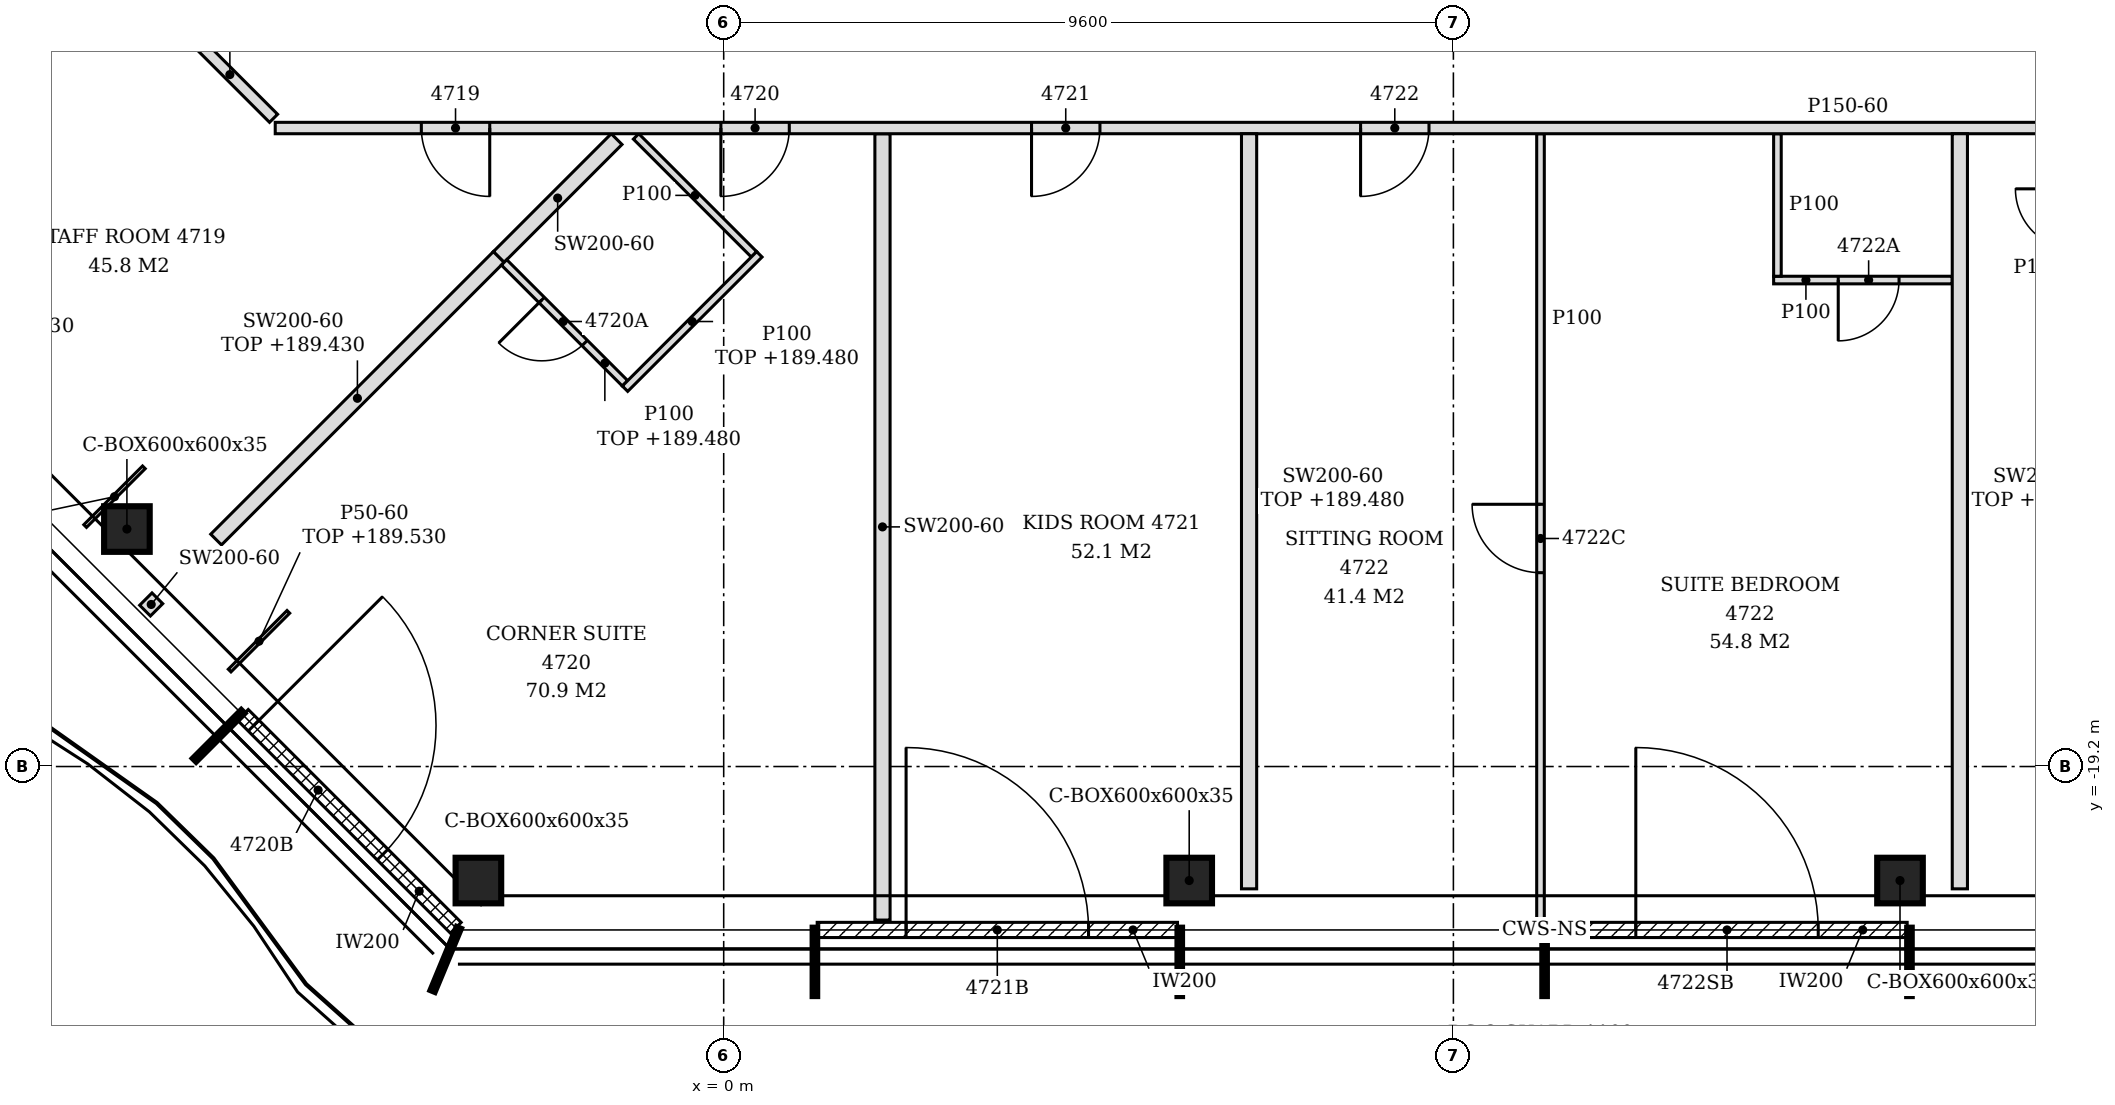
"""IFC4 building model, lengths in metres.
Left out: names, types, materials, properties, quantities, classifications, styles, units other than length and angle.
Written with IfcOpenShell. Run it as: python <this file> out.ifc"""

import sys

from ifc_helpers import new_model, si_unit, direction, frame, frame_2d, origin, origin_2d, place, context, subcontext, project, spatial, polyline, rectangle, hollow_rectangle, outline, extrude, clip, halfspace, element, fill, save


model = new_model("IFC4")
c1 = context("Model", 3, precision=1e-05, world=origin(), true_north=direction((0.0, 1.0)))
c2 = subcontext(c1, "Body", "Model", "MODEL_VIEW")
j1 = project(units=[si_unit("LENGTHUNIT", "METRE"), si_unit("PLANEANGLEUNIT", "RADIAN")], contexts=[c1])
p1 = place(None, origin())
s1 = spatial("IfcSite", under=j1, at=p1, CompositionType="ELEMENT")
p2 = place(p1, origin())
s2 = spatial("IfcBuilding", under=s1, at=p2, CompositionType="ELEMENT")
p3 = place(p2, frame((0.0, 0.0, 186.6)))
s3 = spatial("IfcBuildingStorey", under=s2, at=p3, CompositionType="ELEMENT", Elevation=186.6)
p4 = place(p3, frame((-3.227, -20.7, -0.15), z_axis=(0.38726387287, -0.258155907814, 0.885088820419), x_axis=(0.554670435147, 0.832070134288, 0.0)))
e1 = element("IfcColumn", 1, at=p4, inside=s3, PredefinedType="COLUMN", context=c2, shape_type="Clipping", body=[
    clip(extrude(hollow_rectangle(XDim=0.6, YDim=0.6, WallThickness=0.035, at=origin_2d()), origin(), (0.0, 0.0, 1.0), 4.067), halfspace(frame((0.0, 0.0, 4.049), z_axis=(0.0, 0.0, 1.0), x_axis=(1.0, 0.0, 0.0)), False)),
])
p5 = place(p3, frame((6.124, -20.7, -0.15), z_axis=(0.387212850535, -0.258161908255, 0.885109392961), x_axis=(0.554729959787, 0.832030451194, 0.0)))
e2 = element("IfcColumn", 2, at=p5, inside=s3, PredefinedType="COLUMN", context=c2, shape_type="Clipping", body=[
    clip(extrude(hollow_rectangle(XDim=0.6, YDim=0.6, WallThickness=0.035, at=origin_2d()), origin(), (0.0, 0.0, 1.0), 4.067), halfspace(frame((0.0, 0.0, 4.049), z_axis=(0.0, 0.0, 1.0), x_axis=(1.0, 0.0, 0.0)), False)),
])
p6 = place(p3, frame((15.476, -20.7, -0.15), z_axis=(0.38726387287, -0.258155907814, 0.885088820419), x_axis=(0.554670435147, 0.832070134288, 0.0)))
e3 = element("IfcColumn", 3, at=p6, inside=s3, PredefinedType="COLUMN", context=c2, shape_type="Clipping", body=[
    clip(extrude(hollow_rectangle(XDim=0.6, YDim=0.6, WallThickness=0.035, at=origin_2d()), origin(), (0.0, 0.0, 1.0), 4.067), halfspace(frame((0.0, 0.0, 4.049), z_axis=(0.0, 0.0, 1.0), x_axis=(1.0, 0.0, 0.0)), False)),
])
p7 = place(p3, frame((-7.852, -16.076, -0.15), z_axis=(0.387212850535, -0.258161908255, 0.885109392961), x_axis=(0.554729959787, 0.832030451194, 0.0)))
e4 = element("IfcColumn", 4, at=p7, inside=s3, PredefinedType="COLUMN", context=c2, shape_type="Clipping", body=[
    clip(extrude(hollow_rectangle(XDim=0.6, YDim=0.6, WallThickness=0.035, at=origin_2d()), origin(), (0.0, 0.0, 1.0), 4.067), halfspace(frame((0.0, 0.0, 4.049), z_axis=(0.0, 0.0, 1.0), x_axis=(1.0, 0.0, 0.0)), False)),
])
p8 = place(p3, frame((1.23, -21.35, 0.0), z_axis=(0.0, 0.0, 1.0), x_axis=(1.0, 0.0, 0.0)))
e5 = element("IfcWall", 5, at=p8, inside=s3, PredefinedType="NOTDEFINED", context=c2, shape_type="SweptSolid", body=[
    extrude(rectangle(XDim=4.74, YDim=0.2, at=frame_2d((2.37, 0.0))), origin(), (0.0, 0.0, 1.0), 3.45),
])
p9 = place(p8, frame((1.17, 0.0, 0.0)))
e6 = element("IfcOpeningElement", 6, at=p9, cuts=e5, PredefinedType="OPENING", context=c2, shape_type="SweptSolid", body=[
    extrude(rectangle(XDim=2.4, YDim=2.4, at=frame_2d((1.2, 1.2))), frame((0.0, 0.11, 0.0), z_axis=(0.0, -1.0, 0.0), x_axis=(1.0, 0.0, 0.0)), (0.0, 0.0, 1.0), 0.22),
])
p10 = place(p3, frame((10.83, -21.35, 0.0), z_axis=(0.0, 0.0, 1.0), x_axis=(1.0, 0.0, 0.0)))
e7 = element("IfcWall", 7, at=p10, inside=s3, PredefinedType="NOTDEFINED", context=c2, shape_type="SweptSolid", body=[
    extrude(rectangle(XDim=4.74, YDim=0.2, at=frame_2d((2.37, 0.0))), origin(), (0.0, 0.0, 1.0), 3.45),
])
p11 = place(p10, frame((1.17, 0.0, 0.0)))
e8 = element("IfcOpeningElement", 8, at=p11, cuts=e7, PredefinedType="OPENING", context=c2, shape_type="SweptSolid", body=[
    extrude(rectangle(XDim=2.4, YDim=2.4, at=frame_2d((1.2, 1.2))), frame((0.0, 0.11, 0.0), z_axis=(0.0, -1.0, 0.0), x_axis=(1.0, 0.0, 0.0)), (0.0, 0.0, 1.0), 0.22),
])
p12 = place(p3, frame((-6.326, -18.521, 0.0), z_axis=(0.0, 0.0, 1.0), x_axis=(0.707106781187, -0.707106781187, 0.0)))
e9 = element("IfcWall", 9, at=p12, inside=s3, PredefinedType="NOTDEFINED", context=c2, shape_type="SweptSolid", body=[
    extrude(rectangle(XDim=3.962, YDim=0.2, at=frame_2d((1.981, 0.0))), origin(), (0.0, 0.0, 1.0), 3.45),
])
p13 = place(p12, frame((0.2, 0.0, 0.0)))
e10 = element("IfcOpeningElement", 10, at=p13, cuts=e9, PredefinedType="OPENING", context=c2, shape_type="SweptSolid", body=[
    extrude(rectangle(XDim=2.4, YDim=2.4, at=frame_2d((1.2, 1.2))), frame((0.0, 0.11, 0.0), z_axis=(0.0, -1.0, 0.0), x_axis=(1.0, 0.0, 0.0)), (0.0, 0.0, 1.0), 0.22),
])
p14 = place(p3, frame((10.746, -21.303, 0.0), z_axis=(0.0, 0.0, 1.0), x_axis=(0.0, 1.0, 0.0)))
e11 = element("IfcWall", 11, at=p14, inside=s3, PredefinedType="PARTITIONING", context=c2, shape_type="SweptSolid", body=[
    extrude(outline(polyline([(0.0, 0.0), (10.428, 0.0), (10.428, 3.45), (8.358, 3.45), (8.356, 2.88), (8.148, 2.88), (8.146, 3.45), (3.558, 3.45), (3.556, 2.88), (3.348, 2.88), (3.346, 3.45), (0.0, 3.45), (0.0, 0.0)])), frame((0.0, 0.05, 0.0), z_axis=(0.0, -1.0, 0.0), x_axis=(1.0, 0.0, 0.0)), (0.0, 0.0, 1.0), 0.1),
])
p15 = place(p14, frame((4.653, 0.0, 0.0)))
e12 = element("IfcOpeningElement", 12, at=p15, cuts=e11, PredefinedType="OPENING", context=c2, shape_type="SweptSolid", body=[
    extrude(rectangle(XDim=0.9, YDim=2.1, at=frame_2d((0.45, 1.05))), frame((0.0, 0.06, 0.0), z_axis=(0.0, -1.0, 0.0), x_axis=(1.0, 0.0, 0.0)), (0.0, 0.0, 1.0), 0.12),
])
p16 = place(p3, frame((2.089, -21.22, 0.0), z_axis=(0.0, 0.0, 1.0), x_axis=(0.0, 1.0, 0.0)))
e13 = element("IfcWall", 13, at=p16, inside=s3, PredefinedType="PARTITIONING", context=c2, shape_type="SweptSolid", body=[
    extrude(outline(polyline([(0.0, 0.0), (10.345, 0.0), (10.345, 3.45), (8.275, 3.45), (8.273, 2.88), (8.065, 2.88), (8.063, 3.45), (3.475, 3.45), (3.473, 2.88), (3.265, 2.88), (3.263, 3.45), (0.0, 3.45), (0.0, 0.0)])), frame((0.0, 0.1, 0.0), z_axis=(0.0, -1.0, 0.0), x_axis=(1.0, 0.0, 0.0)), (0.0, 0.0, 1.0), 0.2),
])
p17 = place(p3, frame((6.912, -20.809, 0.0), z_axis=(0.0, 0.0, 1.0), x_axis=(0.0, 1.0, 0.0)))
e14 = element("IfcWall", 14, at=p17, inside=s3, PredefinedType="PARTITIONING", context=c2, shape_type="SweptSolid", body=[
    extrude(outline(polyline([(0.011, 0.0), (9.934, 0.0), (9.934, 0.862), (9.934, 1.725), (9.934, 2.587), (9.934, 2.88), (0.0, 2.88), (0.0, 2.587), (0.0, 1.725), (0.011, 0.862), (0.011, 0.0)])), frame((0.0, 0.1, 0.0), z_axis=(0.0, -1.0, 0.0), x_axis=(1.0, 0.0, 0.0)), (0.0, 0.0, 1.0), 0.2),
])
p18 = place(p3, frame((16.263, -20.809, 0.0), z_axis=(0.0, 0.0, 1.0), x_axis=(0.0, 1.0, 0.0)))
e15 = element("IfcWall", 15, at=p18, inside=s3, PredefinedType="PARTITIONING", context=c2, shape_type="SweptSolid", body=[
    extrude(outline(polyline([(0.012, 0.0), (9.934, 0.0), (9.934, 0.862), (9.934, 1.725), (9.934, 2.587), (9.934, 2.88), (0.0, 2.88), (0.0, 2.587), (0.0, 1.725), (0.012, 0.862), (0.012, 0.0)])), frame((0.0, 0.1, 0.0), z_axis=(0.0, -1.0, 0.0), x_axis=(1.0, 0.0, 0.0)), (0.0, 0.0, 1.0), 0.2),
])
p19 = place(p3, frame((-7.613, -17.149, 0.0), z_axis=(0.0, 0.0, 1.0), x_axis=(0.707639441435, 0.706573719385, 0.0)))
e16 = element("IfcWall", 16, at=p19, inside=s3, PredefinedType="PARTITIONING", context=c2, shape_type="SweptSolid", body=[
    extrude(rectangle(XDim=0.229, YDim=0.2, at=frame_2d((0.115, 0.0))), origin(), (0.0, 0.0, 1.0), 3.45),
])
p20 = place(p3, frame((-6.678, -16.214, 0.0), z_axis=(0.0, 0.0, 1.0), x_axis=(0.707199650476, 0.707013899698, 0.0)))
e17 = element("IfcWall", 17, at=p20, inside=s3, PredefinedType="PARTITIONING", context=c2, shape_type="SweptSolid", body=[
    extrude(rectangle(XDim=5.257, YDim=0.2, at=frame_2d((2.629, 0.0))), origin(), (0.0, 0.0, 1.0), 2.83),
])
p21 = place(p3, frame((-1.298, -14.159, 0.0), z_axis=(0.0, 0.0, 1.0), x_axis=(-0.707106781187, 0.707106781187, 0.0)))
e18 = element("IfcWall", 18, at=p21, inside=s3, PredefinedType="PARTITIONING", context=c2, shape_type="SweptSolid", body=[
    extrude(rectangle(XDim=2.25, YDim=0.1, at=frame_2d((1.125, 0.0))), origin(), (0.0, 0.0, 1.0), 2.88),
])
p22 = place(p21, frame((0.75, 0.0, 0.0)))
e19 = element("IfcOpeningElement", 19, at=p22, cuts=e18, PredefinedType="OPENING", context=c2, shape_type="SweptSolid", body=[
    extrude(rectangle(XDim=0.8, YDim=2.1, at=frame_2d((0.4, 1.05))), frame((0.0, 0.06, 0.0), z_axis=(0.0, -1.0, 0.0), x_axis=(1.0, 0.0, 0.0)), (0.0, 0.0, 1.0), 0.12),
])
p23 = place(p3, frame((-1.298, -14.229, 0.0), z_axis=(0.0, 0.0, 1.0), x_axis=(0.707057949532, 0.707155609469, 0.0)))
e20 = element("IfcWall", 20, at=p23, inside=s3, PredefinedType="PARTITIONING", context=c2, shape_type="SweptSolid", body=[
    extrude(rectangle(XDim=2.5, YDim=0.1, at=frame_2d((1.25, 0.0))), origin(), (0.0, 0.0, 1.0), 2.88),
])
p24 = place(p3, frame((13.813, -12.8, 0.0), z_axis=(0.0, 0.0, 1.0), x_axis=(1.0, 0.0, 0.0)))
e21 = element("IfcWall", 21, at=p24, inside=s3, PredefinedType="PARTITIONING", context=c2, shape_type="SweptSolid", body=[
    extrude(rectangle(XDim=2.35, YDim=0.1, at=frame_2d((1.175, 0.0))), origin(), (0.0, 0.0, 1.0), 3.45),
])
p25 = place(p24, frame((0.85, 0.0, 0.0)))
e22 = element("IfcOpeningElement", 22, at=p25, cuts=e21, PredefinedType="OPENING", context=c2, shape_type="SweptSolid", body=[
    extrude(rectangle(XDim=0.8, YDim=2.1, at=frame_2d((0.4, 1.05))), frame((0.0, 0.06, 0.0), z_axis=(0.0, -1.0, 0.0), x_axis=(1.0, 0.0, 0.0)), (0.0, 0.0, 1.0), 0.12),
])
p26 = place(p3, frame((13.863, -12.75, 0.0), z_axis=(0.0, 0.0, 1.0), x_axis=(0.0, 1.0, 0.0)))
e23 = element("IfcWall", 23, at=p26, inside=s3, PredefinedType="PARTITIONING", context=c2, shape_type="SweptSolid", body=[
    extrude(rectangle(XDim=1.875, YDim=0.1, at=frame_2d((0.938, 0.0))), origin(), (0.0, 0.0, 1.0), 3.45),
])
p27 = place(p3, frame((-2.96, -12.497, 0.0), z_axis=(0.0, 0.0, 1.0), x_axis=(0.707106781187, 0.707106781187, 0.0)))
e24 = element("IfcWall", 24, at=p27, inside=s3, PredefinedType="PARTITIONING", context=c2, shape_type="SweptSolid", body=[
    extrude(rectangle(XDim=2.194, YDim=0.2, at=frame_2d((1.097, 0.0))), origin(), (0.0, 0.0, 1.0), 3.45),
])
p28 = place(p3, frame((0.399, -12.462, 0.0), z_axis=(0.0, 0.0, 1.0), x_axis=(-0.707106781187, 0.707106781187, 0.0)))
e25 = element("IfcWall", 25, at=p28, inside=s3, PredefinedType="PARTITIONING", context=c2, shape_type="SweptSolid", body=[
    extrude(rectangle(XDim=2.194, YDim=0.1, at=frame_2d((1.097, 0.0))), origin(), (0.0, 0.0, 1.0), 3.45),
])
p29 = place(p3, frame((-11.302, -11.59, 0.0), z_axis=(0.0, 0.0, 1.0), x_axis=(0.707106781187, 0.707106781187, 0.0)))
e26 = element("IfcWall", 26, at=p29, inside=s3, PredefinedType="PARTITIONING", context=c2, shape_type="SweptSolid", body=[
    extrude(rectangle(XDim=5.595, YDim=0.2, at=frame_2d((2.797, 0.0))), origin(), (0.0, 0.0, 1.0), 2.93),
])
p30 = place(p3, frame((-5.9, -10.8, 0.0), z_axis=(0.0, 0.0, 1.0), x_axis=(1.0, 0.0, 0.0)))
e27 = element("IfcWall", 27, at=p30, inside=s3, PredefinedType="PARTITIONING", context=c2, shape_type="SweptSolid", body=[
    extrude(outline(polyline([(0.0, 0.0), (26.2, 0.0), (26.2, 3.45), (25.25, 3.45), (25.248, 2.73), (24.95, 2.73), (24.948, 3.45), (13.25, 3.45), (13.248, 2.73), (12.95, 2.73), (12.948, 3.45), (1.25, 3.45), (1.248, 2.83), (0.95, 2.83), (0.948, 3.45), (0.0, 3.45), (0.0, 0.0)])), frame((0.0, 0.075, 0.0), z_axis=(0.0, -1.0, 0.0), x_axis=(1.0, 0.0, 0.0)), (0.0, 0.0, 1.0), 0.15),
])
p31 = place(p30, frame((1.922, 0.0, 0.0)))
e28 = element("IfcOpeningElement", 28, at=p31, cuts=e27, PredefinedType="OPENING", context=c2, shape_type="SweptSolid", body=[
    extrude(rectangle(XDim=0.9, YDim=2.1, at=frame_2d((0.45, 1.05))), frame((0.0, 0.085, 0.0), z_axis=(0.0, -1.0, 0.0), x_axis=(1.0, 0.0, 0.0)), (0.0, 0.0, 1.0), 0.17),
])
p32 = place(p30, frame((5.863, 0.0, 0.0)))
e29 = element("IfcOpeningElement", 29, at=p32, cuts=e27, PredefinedType="OPENING", context=c2, shape_type="SweptSolid", body=[
    extrude(rectangle(XDim=0.9, YDim=2.1, at=frame_2d((0.45, 1.05))), frame((0.0, 0.085, 0.0), z_axis=(0.0, -1.0, 0.0), x_axis=(1.0, 0.0, 0.0)), (0.0, 0.0, 1.0), 0.17),
])
p33 = place(p30, frame((9.95, 0.0, 0.0)))
e30 = element("IfcOpeningElement", 30, at=p33, cuts=e27, PredefinedType="OPENING", context=c2, shape_type="SweptSolid", body=[
    extrude(rectangle(XDim=0.9, YDim=2.1, at=frame_2d((0.45, 1.05))), frame((0.0, 0.085, 0.0), z_axis=(0.0, -1.0, 0.0), x_axis=(1.0, 0.0, 0.0)), (0.0, 0.0, 1.0), 0.17),
])
p34 = place(p30, frame((14.279, 0.0, 0.0)))
e31 = element("IfcOpeningElement", 31, at=p34, cuts=e27, PredefinedType="OPENING", context=c2, shape_type="SweptSolid", body=[
    extrude(rectangle(XDim=0.9, YDim=2.1, at=frame_2d((0.45, 1.05))), frame((0.0, 0.085, 0.0), z_axis=(0.0, -1.0, 0.0), x_axis=(1.0, 0.0, 0.0)), (0.0, 0.0, 1.0), 0.17),
])
p35 = place(p3, frame((-5.922, -10.672, 0.0), z_axis=(0.0, 0.0, 1.0), x_axis=(-0.707031720757, 0.707181833649, 0.0)))
e32 = element("IfcWall", 32, at=p35, inside=s3, PredefinedType="PARTITIONING", context=c2, shape_type="SweptSolid", body=[
    extrude(rectangle(XDim=1.626, YDim=0.15, at=frame_2d((0.813, 0.0))), origin(), (0.0, 0.0, 1.0), 3.45),
])
p36 = place(p3, frame((-6.5, -17.938, 0.0), z_axis=(0.0, 0.0, 1.0), x_axis=(0.707106781187, 0.707106781187, 0.0)))
e33 = element("IfcWall", 33, at=p36, inside=s3, PredefinedType="PARTITIONING", context=c2, shape_type="SweptSolid", body=[
    extrude(rectangle(XDim=1.093, YDim=0.05, at=frame_2d((0.546, 0.0))), origin(), (0.0, 0.0, 1.0), 2.93),
])
p37 = place(p3, frame((-8.401, -16.036, 0.0), z_axis=(0.0, 0.0, 1.0), x_axis=(0.707106781187, 0.707106781187, 0.0)))
e34 = element("IfcWall", 34, at=p37, inside=s3, PredefinedType="PARTITIONING", context=c2, shape_type="SweptSolid", body=[
    extrude(rectangle(XDim=1.093, YDim=0.05, at=frame_2d((0.546, 0.0))), origin(), (0.0, 0.0, 1.0), 2.63),
])
p38 = place(p9, origin())
e35 = element("IfcDoor", 35, at=p38, inside=s3, OperationType="SINGLE_SWING_LEFT", PredefinedType="DOOR", context=c2, shape_type="SweptSolid", body=[
    extrude(rectangle(XDim=2.4, YDim=2.4, at=frame_2d((1.2, 1.2))), frame((0.0, 0.025, 0.0), z_axis=(0.0, -1.0, 0.0), x_axis=(1.0, 0.0, 0.0)), (0.0, 0.0, 1.0), 0.05),
])
fill(e6, e35)
p39 = place(p11, origin())
e36 = element("IfcDoor", 36, at=p39, inside=s3, OperationType="SINGLE_SWING_LEFT", PredefinedType="DOOR", context=c2, shape_type="SweptSolid", body=[
    extrude(rectangle(XDim=2.4, YDim=2.4, at=frame_2d((1.2, 1.2))), frame((0.0, 0.025, 0.0), z_axis=(0.0, -1.0, 0.0), x_axis=(1.0, 0.0, 0.0)), (0.0, 0.0, 1.0), 0.05),
])
fill(e8, e36)
p40 = place(p13, origin())
e37 = element("IfcDoor", 37, at=p40, inside=s3, OperationType="SINGLE_SWING_LEFT", PredefinedType="DOOR", context=c2, shape_type="SweptSolid", body=[
    extrude(rectangle(XDim=2.4, YDim=2.4, at=frame_2d((1.2, 1.2))), frame((0.0, 0.025, 0.0), z_axis=(0.0, -1.0, 0.0), x_axis=(1.0, 0.0, 0.0)), (0.0, 0.0, 1.0), 0.05),
])
fill(e10, e37)
p41 = place(p31, frame((0.9, 0.0, 0.0), z_axis=(0.0, 0.0, 1.0), x_axis=(-1.0, 0.0, 0.0)))
e38 = element("IfcDoor", 38, at=p41, inside=s3, OperationType="SINGLE_SWING_LEFT", PredefinedType="DOOR", context=c2, shape_type="SweptSolid", body=[
    extrude(rectangle(XDim=0.9, YDim=2.1, at=frame_2d((0.45, 1.05))), frame((0.0, 0.025, 0.0), z_axis=(0.0, -1.0, 0.0), x_axis=(1.0, 0.0, 0.0)), (0.0, 0.0, 1.0), 0.05),
])
fill(e28, e38)
p42 = place(p32, frame((0.9, 0.0, 0.0), z_axis=(0.0, 0.0, 1.0), x_axis=(-1.0, 0.0, 0.0)))
e39 = element("IfcDoor", 39, at=p42, inside=s3, OperationType="SINGLE_SWING_RIGHT", PredefinedType="DOOR", context=c2, shape_type="SweptSolid", body=[
    extrude(rectangle(XDim=0.9, YDim=2.1, at=frame_2d((0.45, 1.05))), frame((0.0, 0.025, 0.0), z_axis=(0.0, -1.0, 0.0), x_axis=(1.0, 0.0, 0.0)), (0.0, 0.0, 1.0), 0.05),
])
fill(e29, e39)
p43 = place(p22, origin())
e40 = element("IfcDoor", 40, at=p43, inside=s3, OperationType="SINGLE_SWING_RIGHT", PredefinedType="DOOR", context=c2, shape_type="SweptSolid", body=[
    extrude(rectangle(XDim=0.8, YDim=2.1, at=frame_2d((0.4, 1.05))), frame((0.0, 0.025, 0.0), z_axis=(0.0, -1.0, 0.0), x_axis=(1.0, 0.0, 0.0)), (0.0, 0.0, 1.0), 0.05),
])
fill(e19, e40)
p44 = place(p33, frame((0.9, 0.0, 0.0), z_axis=(0.0, 0.0, 1.0), x_axis=(-1.0, 0.0, 0.0)))
e41 = element("IfcDoor", 41, at=p44, inside=s3, OperationType="SINGLE_SWING_RIGHT", PredefinedType="DOOR", context=c2, shape_type="SweptSolid", body=[
    extrude(rectangle(XDim=0.9, YDim=2.1, at=frame_2d((0.45, 1.05))), frame((0.0, 0.025, 0.0), z_axis=(0.0, -1.0, 0.0), x_axis=(1.0, 0.0, 0.0)), (0.0, 0.0, 1.0), 0.05),
])
fill(e30, e41)
p45 = place(p34, frame((0.9, 0.0, 0.0), z_axis=(0.0, 0.0, 1.0), x_axis=(-1.0, 0.0, 0.0)))
e42 = element("IfcDoor", 42, at=p45, inside=s3, OperationType="SINGLE_SWING_RIGHT", PredefinedType="DOOR", context=c2, shape_type="SweptSolid", body=[
    extrude(rectangle(XDim=0.9, YDim=2.1, at=frame_2d((0.45, 1.05))), frame((0.0, 0.025, 0.0), z_axis=(0.0, -1.0, 0.0), x_axis=(1.0, 0.0, 0.0)), (0.0, 0.0, 1.0), 0.05),
])
fill(e31, e42)
p46 = place(p15, origin())
e43 = element("IfcDoor", 43, at=p46, inside=s3, OperationType="SINGLE_SWING_RIGHT", PredefinedType="DOOR", context=c2, shape_type="SweptSolid", body=[
    extrude(rectangle(XDim=0.9, YDim=2.1, at=frame_2d((0.45, 1.05))), frame((0.0, 0.025, 0.0), z_axis=(0.0, -1.0, 0.0), x_axis=(1.0, 0.0, 0.0)), (0.0, 0.0, 1.0), 0.05),
])
fill(e12, e43)
p47 = place(p25, frame((0.8, 0.0, 0.0), z_axis=(0.0, 0.0, 1.0), x_axis=(-1.0, 0.0, 0.0)))
e44 = element("IfcDoor", 44, at=p47, inside=s3, OperationType="SINGLE_SWING_RIGHT", PredefinedType="DOOR", context=c2, shape_type="SweptSolid", body=[
    extrude(rectangle(XDim=0.8, YDim=2.1, at=frame_2d((0.4, 1.05))), frame((0.0, 0.025, 0.0), z_axis=(0.0, -1.0, 0.0), x_axis=(1.0, 0.0, 0.0)), (0.0, 0.0, 1.0), 0.05),
])
fill(e22, e44)
save(model, sys.argv[1])
